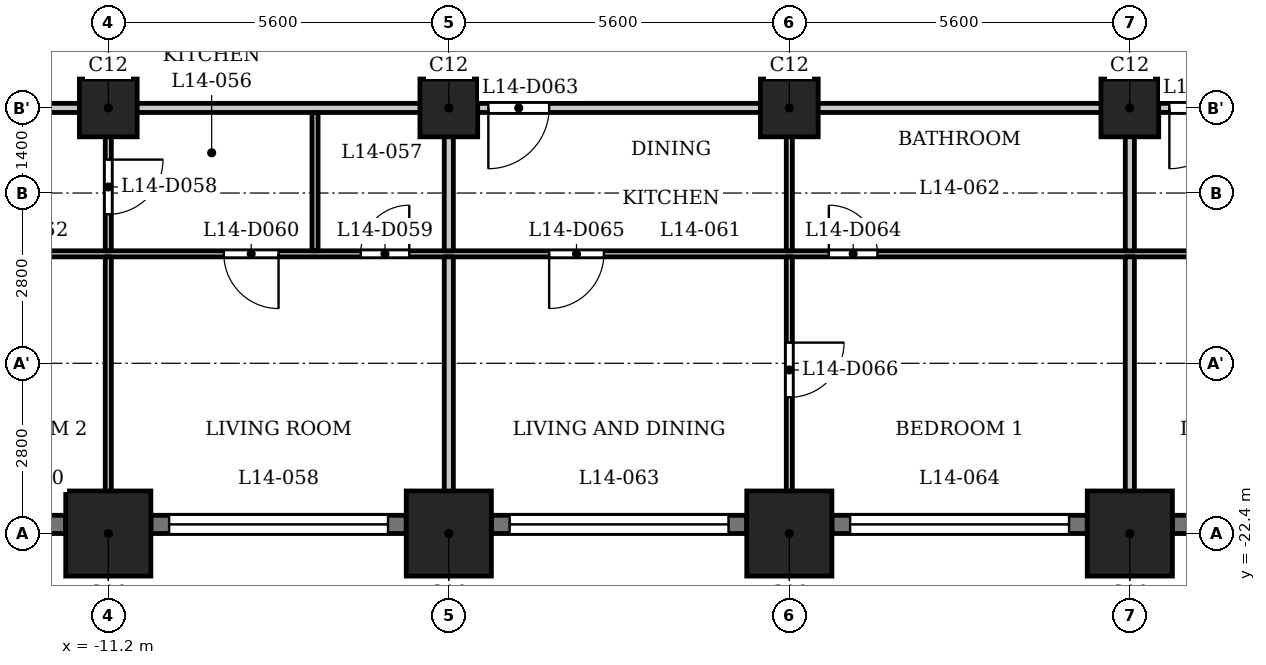
"""IFC4 building model, lengths in metres.
Left out: names, types, materials, properties, quantities, classifications, styles, units other than length and angle.
Written with IfcOpenShell. Run it as: python <this file> out.ifc"""

import sys

from ifc_helpers import new_model, si_unit, direction, frame, frame_2d, origin, origin_2d, place, context, subcontext, project, spatial, rectangle, extrude, element, fill, save


model = new_model("IFC4")
c1 = context("Model", 3, precision=1e-05, world=origin(), true_north=direction((0.0, 1.0)))
c2 = subcontext(c1, "Body", "Model", "MODEL_VIEW")
j1 = project(units=[si_unit("LENGTHUNIT", "METRE"), si_unit("PLANEANGLEUNIT", "RADIAN")], contexts=[c1])
p1 = place(None, origin())
s1 = spatial("IfcSite", under=j1, at=p1, CompositionType="ELEMENT")
p2 = place(p1, origin())
s2 = spatial("IfcBuilding", under=s1, at=p2, CompositionType="ELEMENT")
p3 = place(p2, frame((0.0, 0.0, 58.5)))
s3 = spatial("IfcBuildingStorey", under=s2, at=p3, CompositionType="ELEMENT", Elevation=58.5)
for number, where, z_axis, x_axis in (
    (1, (-11.2, -22.4, 0.0), (0.0, 0.0, 1.0), (1.0, 0.0, 0.0)),
    (2, (-5.6, -22.4, 0.0), (0.0, 0.0, 1.0), (1.0, 0.0, 0.0)),
    (3, (0.0, -22.4, 0.0), (0.0, 0.0, 1.0), (1.0, 0.0, 0.0)),
    (4, (5.6, -22.4, 0.0), (0.0, 0.0, 1.0), (1.0, 0.0, 0.0)),
):
    element("IfcColumn", number, at=place(p3, frame(where, z_axis=z_axis, x_axis=x_axis)), inside=s3, PredefinedType="COLUMN", context=c2, shape_type="SweptSolid", body=[
        extrude(rectangle(XDim=1.4, YDim=1.4, at=origin_2d()), origin(), (0.0, 0.0, 1.0), 3.5),
    ])
for number, where, z_axis, x_axis in (
    (5, (-11.2, -15.4, 0.0), (0.0, 0.0, 1.0), (1.0, 0.0, 0.0)),
    (6, (-5.6, -15.4, 0.0), (0.0, 0.0, 1.0), (1.0, 0.0, 0.0)),
    (7, (0.0, -15.4, 0.0), (0.0, 0.0, 1.0), (1.0, 0.0, 0.0)),
    (8, (5.6, -15.4, 0.0), (0.0, 0.0, 1.0), (1.0, 0.0, 0.0)),
):
    element("IfcColumn", number, at=place(p3, frame(where, z_axis=z_axis, x_axis=x_axis)), inside=s3, PredefinedType="COLUMN", context=c2, shape_type="SweptSolid", body=[
        extrude(rectangle(XDim=0.95, YDim=0.95, at=origin_2d()), origin(), (0.0, 0.0, 1.0), 3.5),
    ])
p4 = place(p3, frame((-16.1, -22.25, 0.0), z_axis=(0.0, 0.0, 1.0), x_axis=(1.0, 0.0, 0.0)))
e9 = element("IfcWall", 9, at=p4, inside=s3, PredefinedType="SOLIDWALL", context=c2, shape_type="SweptSolid", body=[
    extrude(rectangle(XDim=4.2, YDim=0.3, at=frame_2d((2.1, 0.0))), origin(), (0.0, 0.0, 1.0), 2.35),
])
p5 = place(p4, frame((0.413, 0.0, 0.6)))
e10 = element("IfcOpeningElement", 10, at=p5, cuts=e9, PredefinedType="OPENING", context=c2, shape_type="SweptSolid", body=[
    extrude(rectangle(XDim=1.2, YDim=1.55, at=frame_2d((0.6, 0.775))), frame((0.0, 0.16, 0.0), z_axis=(0.0, -1.0, 0.0), x_axis=(1.0, 0.0, 0.0)), (0.0, 0.0, 1.0), 0.32),
])
p6 = place(p4, frame((2.587, 0.0, 0.6)))
e11 = element("IfcOpeningElement", 11, at=p6, cuts=e9, PredefinedType="OPENING", context=c2, shape_type="SweptSolid", body=[
    extrude(rectangle(XDim=1.2, YDim=1.55, at=frame_2d((0.6, 0.775))), frame((0.0, 0.16, 0.0), z_axis=(0.0, -1.0, 0.0), x_axis=(1.0, 0.0, 0.0)), (0.0, 0.0, 1.0), 0.32),
])
p7 = place(p3, frame((-10.5, -22.25, 0.0), z_axis=(0.0, 0.0, 1.0), x_axis=(1.0, 0.0, 0.0)))
e12 = element("IfcWall", 12, at=p7, inside=s3, PredefinedType="SOLIDWALL", context=c2, shape_type="SweptSolid", body=[
    extrude(rectangle(XDim=4.2, YDim=0.3, at=frame_2d((2.1, 0.0))), origin(), (0.0, 0.0, 1.0), 2.35),
])
p8 = place(p7, frame((0.3, 0.0, 1.2)))
e13 = element("IfcOpeningElement", 13, at=p8, cuts=e12, PredefinedType="OPENING", context=c2, shape_type="SweptSolid", body=[
    extrude(rectangle(XDim=3.6, YDim=0.95, at=frame_2d((1.8, 0.475))), frame((0.0, 0.16, 0.0), z_axis=(0.0, -1.0, 0.0), x_axis=(1.0, 0.0, 0.0)), (0.0, 0.0, 1.0), 0.32),
])
p9 = place(p3, frame((-4.9, -22.25, 0.0), z_axis=(0.0, 0.0, 1.0), x_axis=(1.0, 0.0, 0.0)))
e14 = element("IfcWall", 14, at=p9, inside=s3, PredefinedType="SOLIDWALL", context=c2, shape_type="SweptSolid", body=[
    extrude(rectangle(XDim=4.2, YDim=0.3, at=frame_2d((2.1, 0.0))), origin(), (0.0, 0.0, 1.0), 2.35),
])
p10 = place(p9, frame((0.3, 0.0, 1.2)))
e15 = element("IfcOpeningElement", 15, at=p10, cuts=e14, PredefinedType="OPENING", context=c2, shape_type="SweptSolid", body=[
    extrude(rectangle(XDim=3.6, YDim=0.95, at=frame_2d((1.8, 0.475))), frame((0.0, 0.16, 0.0), z_axis=(0.0, -1.0, 0.0), x_axis=(1.0, 0.0, 0.0)), (0.0, 0.0, 1.0), 0.32),
])
p11 = place(p3, frame((0.7, -22.25, 0.0), z_axis=(0.0, 0.0, 1.0), x_axis=(1.0, 0.0, 0.0)))
e16 = element("IfcWall", 16, at=p11, inside=s3, PredefinedType="SOLIDWALL", context=c2, shape_type="SweptSolid", body=[
    extrude(rectangle(XDim=4.2, YDim=0.3, at=frame_2d((2.1, 0.0))), origin(), (0.0, 0.0, 1.0), 2.35),
])
p12 = place(p11, frame((0.3, 0.0, 1.2)))
e17 = element("IfcOpeningElement", 17, at=p12, cuts=e16, PredefinedType="OPENING", context=c2, shape_type="SweptSolid", body=[
    extrude(rectangle(XDim=3.6, YDim=0.95, at=frame_2d((1.8, 0.475))), frame((0.0, 0.16, 0.0), z_axis=(0.0, -1.0, 0.0), x_axis=(1.0, 0.0, 0.0)), (0.0, 0.0, 1.0), 0.32),
])
p13 = place(p3, frame((6.3, -22.25, 0.0), z_axis=(0.0, 0.0, 1.0), x_axis=(1.0, 0.0, 0.0)))
e18 = element("IfcWall", 18, at=p13, inside=s3, PredefinedType="SOLIDWALL", context=c2, shape_type="SweptSolid", body=[
    extrude(rectangle(XDim=4.2, YDim=0.3, at=frame_2d((2.1, 0.0))), origin(), (0.0, 0.0, 1.0), 2.35),
])
p14 = place(p13, frame((0.3, 0.0, 1.2)))
e19 = element("IfcOpeningElement", 19, at=p14, cuts=e18, PredefinedType="OPENING", context=c2, shape_type="SweptSolid", body=[
    extrude(rectangle(XDim=3.6, YDim=0.95, at=frame_2d((1.8, 0.475))), frame((0.0, 0.16, 0.0), z_axis=(0.0, -1.0, 0.0), x_axis=(1.0, 0.0, 0.0)), (0.0, 0.0, 1.0), 0.32),
])
p15 = place(p3, frame((-26.394, -17.8, 0.0), z_axis=(0.0, 0.0, 1.0), x_axis=(1.0, 0.0, 0.0)))
e20 = element("IfcWall", 20, at=p15, inside=s3, PredefinedType="PARTITIONING", context=c2, shape_type="SweptSolid", body=[
    extrude(rectangle(XDim=53.034, YDim=0.1, at=frame_2d((26.517, 0.0))), origin(), (0.0, 0.0, 1.0), 3.2),
])
p16 = place(p15, frame((0.794, 0.0, 0.0)))
e21 = element("IfcOpeningElement", 21, at=p16, cuts=e20, PredefinedType="OPENING", context=c2, shape_type="SweptSolid", body=[
    extrude(rectangle(XDim=0.8, YDim=2.1, at=frame_2d((0.4, 1.05))), frame((0.0, 0.06, 0.0), z_axis=(0.0, -1.0, 0.0), x_axis=(1.0, 0.0, 0.0)), (0.0, 0.0, 1.0), 0.12),
])
p17 = place(p15, frame((5.644, 0.0, 0.0)))
e22 = element("IfcOpeningElement", 22, at=p17, cuts=e20, PredefinedType="OPENING", context=c2, shape_type="SweptSolid", body=[
    extrude(rectangle(XDim=0.9, YDim=2.1, at=frame_2d((0.45, 1.05))), frame((0.0, 0.06, 0.0), z_axis=(0.0, -1.0, 0.0), x_axis=(1.0, 0.0, 0.0)), (0.0, 0.0, 1.0), 0.12),
])
p18 = place(p15, frame((19.344, 0.0, 0.0)))
e23 = element("IfcOpeningElement", 23, at=p18, cuts=e20, PredefinedType="OPENING", context=c2, shape_type="SweptSolid", body=[
    extrude(rectangle(XDim=0.8, YDim=2.1, at=frame_2d((0.4, 1.05))), frame((0.0, 0.06, 0.0), z_axis=(0.0, -1.0, 0.0), x_axis=(1.0, 0.0, 0.0)), (0.0, 0.0, 1.0), 0.12),
])
p19 = place(p15, frame((17.094, 0.0, 0.0)))
e24 = element("IfcOpeningElement", 24, at=p19, cuts=e20, PredefinedType="OPENING", context=c2, shape_type="SweptSolid", body=[
    extrude(rectangle(XDim=0.9, YDim=2.1, at=frame_2d((0.45, 1.05))), frame((0.0, 0.06, 0.0), z_axis=(0.0, -1.0, 0.0), x_axis=(1.0, 0.0, 0.0)), (0.0, 0.0, 1.0), 0.12),
])
p20 = place(p15, frame((10.494, 0.0, 0.0)))
e25 = element("IfcOpeningElement", 25, at=p20, cuts=e20, PredefinedType="OPENING", context=c2, shape_type="SweptSolid", body=[
    extrude(rectangle(XDim=0.9, YDim=2.1, at=frame_2d((0.45, 1.05))), frame((0.0, 0.06, 0.0), z_axis=(0.0, -1.0, 0.0), x_axis=(1.0, 0.0, 0.0)), (0.0, 0.0, 1.0), 0.12),
])
p21 = place(p15, frame((13.294, 0.0, 0.0)))
e26 = element("IfcOpeningElement", 26, at=p21, cuts=e20, PredefinedType="OPENING", context=c2, shape_type="SweptSolid", body=[
    extrude(rectangle(XDim=0.9, YDim=2.1, at=frame_2d((0.45, 1.05))), frame((0.0, 0.06, 0.0), z_axis=(0.0, -1.0, 0.0), x_axis=(1.0, 0.0, 0.0)), (0.0, 0.0, 1.0), 0.12),
])
p22 = place(p15, frame((27.044, 0.0, 0.0)))
e27 = element("IfcOpeningElement", 27, at=p22, cuts=e20, PredefinedType="OPENING", context=c2, shape_type="SweptSolid", body=[
    extrude(rectangle(XDim=0.8, YDim=2.1, at=frame_2d((0.4, 1.05))), frame((0.0, 0.06, 0.0), z_axis=(0.0, -1.0, 0.0), x_axis=(1.0, 0.0, 0.0)), (0.0, 0.0, 1.0), 0.12),
])
p23 = place(p15, frame((22.444, 0.0, 0.0)))
e28 = element("IfcOpeningElement", 28, at=p23, cuts=e20, PredefinedType="OPENING", context=c2, shape_type="SweptSolid", body=[
    extrude(rectangle(XDim=0.9, YDim=2.1, at=frame_2d((0.45, 1.05))), frame((0.0, 0.06, 0.0), z_axis=(0.0, -1.0, 0.0), x_axis=(1.0, 0.0, 0.0)), (0.0, 0.0, 1.0), 0.12),
])
p24 = place(p15, frame((36.144, 0.0, 0.0)))
e29 = element("IfcOpeningElement", 29, at=p24, cuts=e20, PredefinedType="OPENING", context=c2, shape_type="SweptSolid", body=[
    extrude(rectangle(XDim=0.8, YDim=2.1, at=frame_2d((0.4, 1.05))), frame((0.0, 0.06, 0.0), z_axis=(0.0, -1.0, 0.0), x_axis=(1.0, 0.0, 0.0)), (0.0, 0.0, 1.0), 0.12),
])
p25 = place(p15, frame((33.644, 0.0, 0.0)))
e30 = element("IfcOpeningElement", 30, at=p25, cuts=e20, PredefinedType="OPENING", context=c2, shape_type="SweptSolid", body=[
    extrude(rectangle(XDim=0.9, YDim=2.1, at=frame_2d((0.45, 1.05))), frame((0.0, 0.06, 0.0), z_axis=(0.0, -1.0, 0.0), x_axis=(1.0, 0.0, 0.0)), (0.0, 0.0, 1.0), 0.12),
])
p26 = place(p15, frame((39.144, 0.0, 0.0)))
e31 = element("IfcOpeningElement", 31, at=p26, cuts=e20, PredefinedType="OPENING", context=c2, shape_type="SweptSolid", body=[
    extrude(rectangle(XDim=0.8, YDim=2.1, at=frame_2d((0.4, 1.05))), frame((0.0, 0.06, 0.0), z_axis=(0.0, -1.0, 0.0), x_axis=(1.0, 0.0, 0.0)), (0.0, 0.0, 1.0), 0.12),
])
p27 = place(p15, frame((41.494, 0.0, 0.0)))
e32 = element("IfcOpeningElement", 32, at=p27, cuts=e20, PredefinedType="OPENING", context=c2, shape_type="SweptSolid", body=[
    extrude(rectangle(XDim=0.9, YDim=2.1, at=frame_2d((0.45, 1.05))), frame((0.0, 0.06, 0.0), z_axis=(0.0, -1.0, 0.0), x_axis=(1.0, 0.0, 0.0)), (0.0, 0.0, 1.0), 0.12),
])
p28 = place(p15, frame((49.362, 0.0, 0.0)))
e33 = element("IfcOpeningElement", 33, at=p28, cuts=e20, PredefinedType="OPENING", context=c2, shape_type="SweptSolid", body=[
    extrude(rectangle(XDim=0.8, YDim=2.1, at=frame_2d((0.4, 1.05))), frame((0.0, 0.06, 0.0), z_axis=(0.0, -1.0, 0.0), x_axis=(1.0, 0.0, 0.0)), (0.0, 0.0, 1.0), 0.12),
])
p29 = place(p15, frame((45.094, 0.0, 0.0)))
e34 = element("IfcOpeningElement", 34, at=p29, cuts=e20, PredefinedType="OPENING", context=c2, shape_type="SweptSolid", body=[
    extrude(rectangle(XDim=0.9, YDim=2.1, at=frame_2d((0.45, 1.05))), frame((0.0, 0.06, 0.0), z_axis=(0.0, -1.0, 0.0), x_axis=(1.0, 0.0, 0.0)), (0.0, 0.0, 1.0), 0.12),
])
p30 = place(p3, frame((-27.484, -15.4, 0.0), z_axis=(0.0, 0.0, 1.0), x_axis=(1.0, 0.0, 0.0)))
e35 = element("IfcWall", 35, at=p30, inside=s3, PredefinedType="PARTITIONING", context=c2, shape_type="SweptSolid", body=[
    extrude(rectangle(XDim=54.968, YDim=0.15, at=frame_2d((27.484, 0.0))), origin(), (0.0, 0.0, 1.0), 3.2),
])
p31 = place(p30, frame((5.734, 0.0, 0.0)))
e36 = element("IfcOpeningElement", 36, at=p31, cuts=e35, PredefinedType="OPENING", context=c2, shape_type="SweptSolid", body=[
    extrude(rectangle(XDim=1.0, YDim=2.1, at=frame_2d((0.5, 1.05))), frame((0.0, 0.085, 0.0), z_axis=(0.0, -1.0, 0.0), x_axis=(1.0, 0.0, 0.0)), (0.0, 0.0, 1.0), 0.17),
])
p32 = place(p30, frame((11.584, 0.0, 0.0)))
e37 = element("IfcOpeningElement", 37, at=p32, cuts=e35, PredefinedType="OPENING", context=c2, shape_type="SweptSolid", body=[
    extrude(rectangle(XDim=1.0, YDim=2.1, at=frame_2d((0.5, 1.05))), frame((0.0, 0.085, 0.0), z_axis=(0.0, -1.0, 0.0), x_axis=(1.0, 0.0, 0.0)), (0.0, 0.0, 1.0), 0.17),
])
p33 = place(p30, frame((22.534, 0.0, 0.0)))
e38 = element("IfcOpeningElement", 38, at=p33, cuts=e35, PredefinedType="OPENING", context=c2, shape_type="SweptSolid", body=[
    extrude(rectangle(XDim=1.0, YDim=2.1, at=frame_2d((0.5, 1.05))), frame((0.0, 0.085, 0.0), z_axis=(0.0, -1.0, 0.0), x_axis=(1.0, 0.0, 0.0)), (0.0, 0.0, 1.0), 0.17),
])
p34 = place(p30, frame((33.734, 0.0, 0.0)))
e39 = element("IfcOpeningElement", 39, at=p34, cuts=e35, PredefinedType="OPENING", context=c2, shape_type="SweptSolid", body=[
    extrude(rectangle(XDim=1.0, YDim=2.1, at=frame_2d((0.5, 1.05))), frame((0.0, 0.085, 0.0), z_axis=(0.0, -1.0, 0.0), x_axis=(1.0, 0.0, 0.0)), (0.0, 0.0, 1.0), 0.17),
])
p35 = place(p30, frame((42.334, 0.0, 0.0)))
e40 = element("IfcOpeningElement", 40, at=p35, cuts=e35, PredefinedType="OPENING", context=c2, shape_type="SweptSolid", body=[
    extrude(rectangle(XDim=1.0, YDim=2.1, at=frame_2d((0.5, 1.05))), frame((0.0, 0.085, 0.0), z_axis=(0.0, -1.0, 0.0), x_axis=(1.0, 0.0, 0.0)), (0.0, 0.0, 1.0), 0.17),
])
p36 = place(p30, frame((45.184, 0.0, 0.0)))
e41 = element("IfcOpeningElement", 41, at=p36, cuts=e35, PredefinedType="OPENING", context=c2, shape_type="SweptSolid", body=[
    extrude(rectangle(XDim=1.0, YDim=2.1, at=frame_2d((0.5, 1.05))), frame((0.0, 0.085, 0.0), z_axis=(0.0, -1.0, 0.0), x_axis=(1.0, 0.0, 0.0)), (0.0, 0.0, 1.0), 0.17),
])
p37 = place(p3, frame((-11.2, -23.08, 0.0), z_axis=(0.0, 0.0, 1.0), x_axis=(0.0, 1.0, 0.0)))
e42 = element("IfcWall", 42, at=p37, inside=s3, PredefinedType="PARTITIONING", context=c2, shape_type="SweptSolid", body=[
    extrude(rectangle(XDim=5.23, YDim=0.1, at=frame_2d((2.615, 0.0))), origin(), (0.0, 0.0, 1.0), 3.2),
])
p38 = place(p3, frame((-11.2, -17.75, 0.0), z_axis=(0.0, 0.0, 1.0), x_axis=(0.0, 1.0, 0.0)))
e43 = element("IfcWall", 43, at=p38, inside=s3, PredefinedType="PARTITIONING", context=c2, shape_type="SweptSolid", body=[
    extrude(rectangle(XDim=2.275, YDim=0.1, at=frame_2d((1.137, 0.0))), origin(), (0.0, 0.0, 1.0), 3.2),
])
p39 = place(p38, frame((0.6, 0.0, 0.0)))
e44 = element("IfcOpeningElement", 44, at=p39, cuts=e43, PredefinedType="OPENING", context=c2, shape_type="SweptSolid", body=[
    extrude(rectangle(XDim=0.9, YDim=2.1, at=frame_2d((0.45, 1.05))), frame((0.0, 0.06, 0.0), z_axis=(0.0, -1.0, 0.0), x_axis=(1.0, 0.0, 0.0)), (0.0, 0.0, 1.0), 0.12),
])
p40 = place(p3, frame((-7.8, -17.75, 0.0), z_axis=(0.0, 0.0, 1.0), x_axis=(0.0, 1.0, 0.0)))
e45 = element("IfcWall", 45, at=p40, inside=s3, PredefinedType="PARTITIONING", context=c2, shape_type="SweptSolid", body=[
    extrude(rectangle(XDim=2.275, YDim=0.1, at=frame_2d((1.137, 0.0))), origin(), (0.0, 0.0, 1.0), 3.2),
])
p41 = place(p3, frame((-5.6, -23.08, 0.0), z_axis=(0.0, 0.0, 1.0), x_axis=(0.0, 1.0, 0.0)))
e46 = element("IfcWall", 46, at=p41, inside=s3, PredefinedType="PARTITIONING", context=c2, shape_type="SweptSolid", body=[
    extrude(rectangle(XDim=5.23, YDim=0.15, at=frame_2d((2.615, 0.0))), origin(), (0.0, 0.0, 1.0), 3.2),
])
p42 = place(p3, frame((-5.6, -17.75, 0.0), z_axis=(0.0, 0.0, 1.0), x_axis=(0.0, 1.0, 0.0)))
e47 = element("IfcWall", 47, at=p42, inside=s3, PredefinedType="PARTITIONING", context=c2, shape_type="SweptSolid", body=[
    extrude(rectangle(XDim=2.275, YDim=0.15, at=frame_2d((1.137, 0.0))), origin(), (0.0, 0.0, 1.0), 3.2),
])
p43 = place(p3, frame((0.0, -23.08, 0.0), z_axis=(0.0, 0.0, 1.0), x_axis=(0.0, 1.0, 0.0)))
e48 = element("IfcWall", 48, at=p43, inside=s3, PredefinedType="PARTITIONING", context=c2, shape_type="SweptSolid", body=[
    extrude(rectangle(XDim=5.23, YDim=0.1, at=frame_2d((2.615, 0.0))), origin(), (0.0, 0.0, 1.0), 3.2),
])
p44 = place(p43, frame((2.92, 0.0, 0.0)))
e49 = element("IfcOpeningElement", 49, at=p44, cuts=e48, PredefinedType="OPENING", context=c2, shape_type="SweptSolid", body=[
    extrude(rectangle(XDim=0.9, YDim=2.1, at=frame_2d((0.45, 1.05))), frame((0.0, 0.06, 0.0), z_axis=(0.0, -1.0, 0.0), x_axis=(1.0, 0.0, 0.0)), (0.0, 0.0, 1.0), 0.12),
])
p45 = place(p3, frame((0.0, -17.75, 0.0), z_axis=(0.0, 0.0, 1.0), x_axis=(0.0, 1.0, 0.0)))
e50 = element("IfcWall", 50, at=p45, inside=s3, PredefinedType="PARTITIONING", context=c2, shape_type="SweptSolid", body=[
    extrude(rectangle(XDim=2.275, YDim=0.1, at=frame_2d((1.137, 0.0))), origin(), (0.0, 0.0, 1.0), 3.2),
])
p46 = place(p3, frame((5.6, -23.08, 0.0), z_axis=(0.0, 0.0, 1.0), x_axis=(0.0, 1.0, 0.0)))
e51 = element("IfcWall", 51, at=p46, inside=s3, PredefinedType="PARTITIONING", context=c2, shape_type="SweptSolid", body=[
    extrude(rectangle(XDim=5.23, YDim=0.15, at=frame_2d((2.615, 0.0))), origin(), (0.0, 0.0, 1.0), 3.2),
])
p47 = place(p3, frame((5.6, -17.75, 0.0), z_axis=(0.0, 0.0, 1.0), x_axis=(0.0, 1.0, 0.0)))
e52 = element("IfcWall", 52, at=p47, inside=s3, PredefinedType="PARTITIONING", context=c2, shape_type="SweptSolid", body=[
    extrude(rectangle(XDim=2.275, YDim=0.15, at=frame_2d((1.137, 0.0))), origin(), (0.0, 0.0, 1.0), 3.2),
])
p48 = place(p39, origin())
e53 = element("IfcDoor", 53, at=p48, inside=s3, OperationType="SINGLE_SWING_RIGHT", PredefinedType="DOOR", context=c2, shape_type="SweptSolid", body=[
    extrude(rectangle(XDim=0.9, YDim=2.1, at=frame_2d((0.45, 1.05))), frame((0.0, 0.025, 0.0), z_axis=(0.0, -1.0, 0.0), x_axis=(1.0, 0.0, 0.0)), (0.0, 0.0, 1.0), 0.05),
])
fill(e44, e53)
p49 = place(p18, origin())
e54 = element("IfcDoor", 54, at=p49, inside=s3, OperationType="SINGLE_SWING_LEFT", PredefinedType="DOOR", context=c2, shape_type="SweptSolid", body=[
    extrude(rectangle(XDim=0.8, YDim=2.1, at=frame_2d((0.4, 1.05))), frame((0.0, 0.025, 0.0), z_axis=(0.0, -1.0, 0.0), x_axis=(1.0, 0.0, 0.0)), (0.0, 0.0, 1.0), 0.05),
])
fill(e23, e54)
p50 = place(p19, origin())
e55 = element("IfcDoor", 55, at=p50, inside=s3, OperationType="SINGLE_SWING_RIGHT", PredefinedType="DOOR", context=c2, shape_type="SweptSolid", body=[
    extrude(rectangle(XDim=0.9, YDim=2.1, at=frame_2d((0.45, 1.05))), frame((0.0, 0.025, 0.0), z_axis=(0.0, -1.0, 0.0), x_axis=(1.0, 0.0, 0.0)), (0.0, 0.0, 1.0), 0.05),
])
fill(e24, e55)
p51 = place(p33, origin())
e56 = element("IfcDoor", 56, at=p51, inside=s3, OperationType="SINGLE_SWING_LEFT", PredefinedType="DOOR", context=c2, shape_type="SweptSolid", body=[
    extrude(rectangle(XDim=1.0, YDim=2.1, at=frame_2d((0.5, 1.05))), frame((0.0, 0.025, 0.0), z_axis=(0.0, -1.0, 0.0), x_axis=(1.0, 0.0, 0.0)), (0.0, 0.0, 1.0), 0.05),
])
fill(e38, e56)
p52 = place(p22, origin())
e57 = element("IfcDoor", 57, at=p52, inside=s3, OperationType="SINGLE_SWING_RIGHT", PredefinedType="DOOR", context=c2, shape_type="SweptSolid", body=[
    extrude(rectangle(XDim=0.8, YDim=2.1, at=frame_2d((0.4, 1.05))), frame((0.0, 0.025, 0.0), z_axis=(0.0, -1.0, 0.0), x_axis=(1.0, 0.0, 0.0)), (0.0, 0.0, 1.0), 0.05),
])
fill(e27, e57)
p53 = place(p23, origin())
e58 = element("IfcDoor", 58, at=p53, inside=s3, OperationType="SINGLE_SWING_LEFT", PredefinedType="DOOR", context=c2, shape_type="SweptSolid", body=[
    extrude(rectangle(XDim=0.9, YDim=2.1, at=frame_2d((0.45, 1.05))), frame((0.0, 0.025, 0.0), z_axis=(0.0, -1.0, 0.0), x_axis=(1.0, 0.0, 0.0)), (0.0, 0.0, 1.0), 0.05),
])
fill(e28, e58)
p54 = place(p44, origin())
e59 = element("IfcDoor", 59, at=p54, inside=s3, OperationType="SINGLE_SWING_RIGHT", PredefinedType="DOOR", context=c2, shape_type="SweptSolid", body=[
    extrude(rectangle(XDim=0.9, YDim=2.1, at=frame_2d((0.45, 1.05))), frame((0.0, 0.025, 0.0), z_axis=(0.0, -1.0, 0.0), x_axis=(1.0, 0.0, 0.0)), (0.0, 0.0, 1.0), 0.05),
])
fill(e49, e59)
p55 = place(p34, origin())
e60 = element("IfcDoor", 60, at=p55, inside=s3, OperationType="SINGLE_SWING_LEFT", PredefinedType="DOOR", context=c2, shape_type="SweptSolid", body=[
    extrude(rectangle(XDim=1.0, YDim=2.1, at=frame_2d((0.5, 1.05))), frame((0.0, 0.025, 0.0), z_axis=(0.0, -1.0, 0.0), x_axis=(1.0, 0.0, 0.0)), (0.0, 0.0, 1.0), 0.05),
])
fill(e39, e60)
p56 = place(p8, origin())
e61 = element("IfcWindow", 61, at=p56, inside=s3, PartitioningType="SINGLE_PANEL", PredefinedType="WINDOW", context=c2, shape_type="SweptSolid", body=[
    extrude(rectangle(XDim=3.6, YDim=0.95, at=frame_2d((1.8, 0.475))), frame((0.0, 0.03, 0.0), z_axis=(0.0, -1.0, 0.0), x_axis=(1.0, 0.0, 0.0)), (0.0, 0.0, 1.0), 0.06),
])
fill(e13, e61)
p57 = place(p10, origin())
e62 = element("IfcWindow", 62, at=p57, inside=s3, PartitioningType="SINGLE_PANEL", PredefinedType="WINDOW", context=c2, shape_type="SweptSolid", body=[
    extrude(rectangle(XDim=3.6, YDim=0.95, at=frame_2d((1.8, 0.475))), frame((0.0, 0.03, 0.0), z_axis=(0.0, -1.0, 0.0), x_axis=(1.0, 0.0, 0.0)), (0.0, 0.0, 1.0), 0.06),
])
fill(e15, e62)
p58 = place(p12, origin())
e63 = element("IfcWindow", 63, at=p58, inside=s3, PartitioningType="SINGLE_PANEL", PredefinedType="WINDOW", context=c2, shape_type="SweptSolid", body=[
    extrude(rectangle(XDim=3.6, YDim=0.95, at=frame_2d((1.8, 0.475))), frame((0.0, 0.03, 0.0), z_axis=(0.0, -1.0, 0.0), x_axis=(1.0, 0.0, 0.0)), (0.0, 0.0, 1.0), 0.06),
])
fill(e17, e63)
save(model, sys.argv[1])
